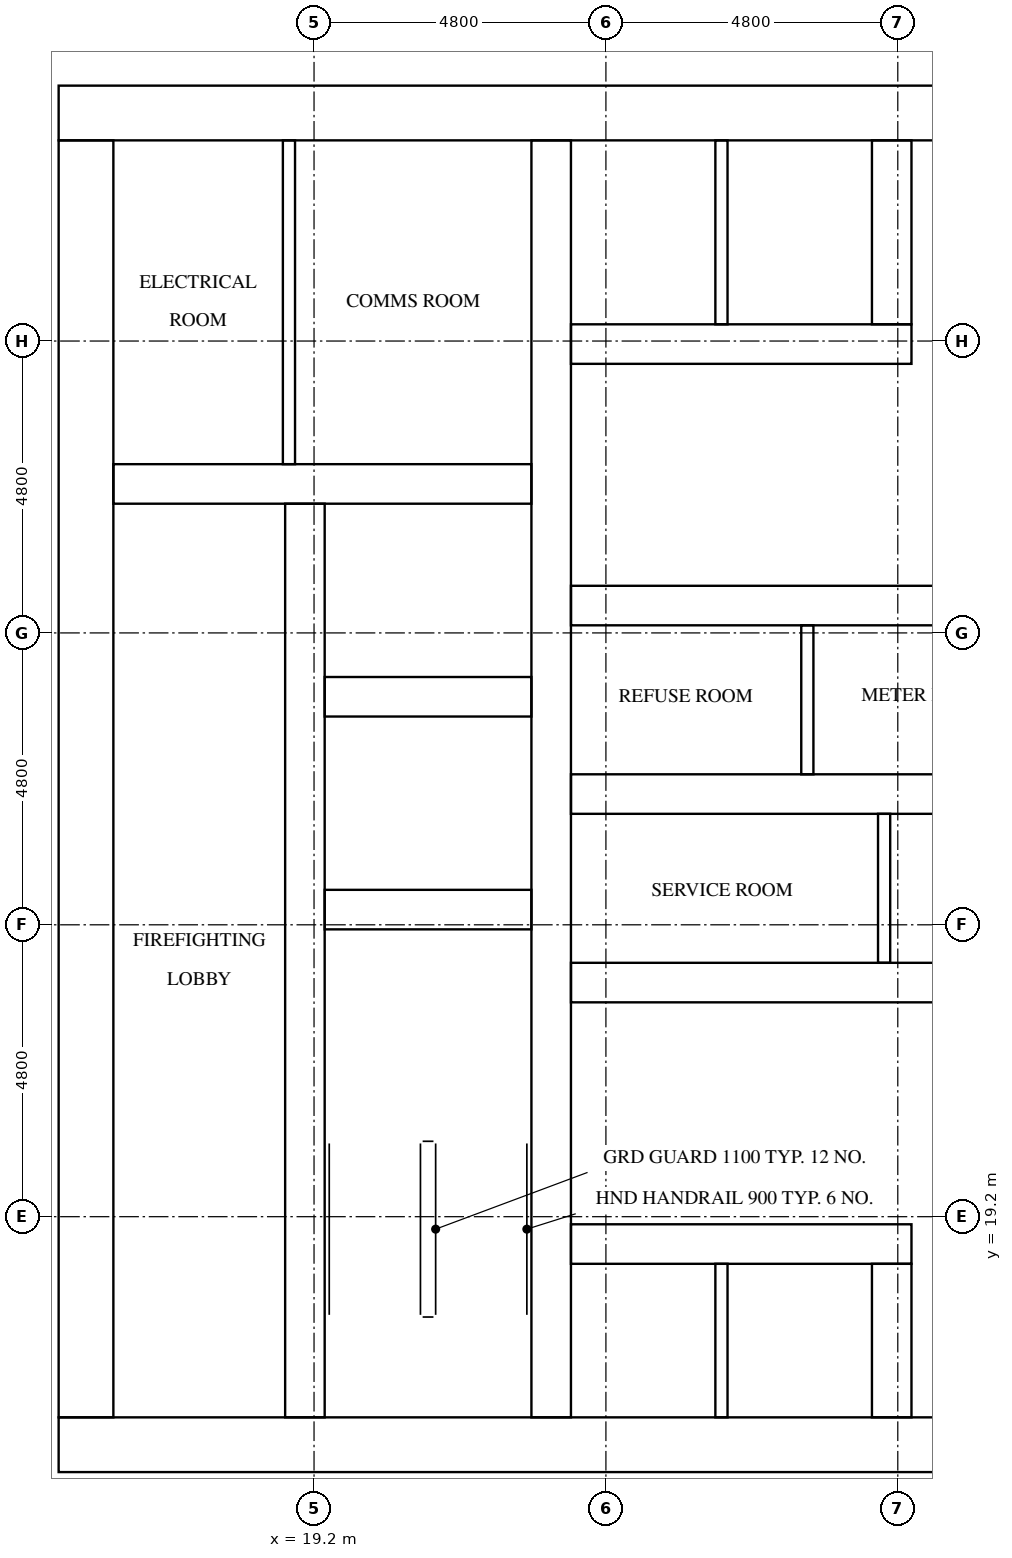
"""IFC4 building model, lengths in metres.
Left out: names, types, materials, properties, quantities, classifications, styles, units other than length and angle.
Written with IfcOpenShell. Run it as: python <this file> out.ifc"""

import sys

from ifc_helpers import new_model, si_unit, direction, frame, frame_2d, origin, place, context, subcontext, project, spatial, rectangle, extrude, element, fill, save


model = new_model("IFC4")
c1 = context("Model", 3, precision=1e-05, world=origin(), true_north=direction((0.0, 1.0)))
c2 = subcontext(c1, "Body", "Model", "MODEL_VIEW")
j1 = project(units=[si_unit("LENGTHUNIT", "METRE"), si_unit("PLANEANGLEUNIT", "RADIAN")], contexts=[c1])
p1 = place(None, origin())
s1 = spatial("IfcSite", under=j1, at=p1, CompositionType="ELEMENT")
p2 = place(p1, origin())
s2 = spatial("IfcBuilding", under=s1, at=p2, CompositionType="ELEMENT")
p3 = place(p2, frame((0.0, 0.0, 103.2)))
s3 = spatial("IfcBuildingStorey", under=s2, at=p3, CompositionType="ELEMENT", Elevation=103.2)
p4 = place(p3, frame((15.0, 15.45, 0.0), z_axis=(0.0, 0.0, 1.0), x_axis=(1.0, 0.0, 0.0)))
e1 = element("IfcWall", 1, at=p4, inside=s3, PredefinedType="SHEAR", context=c2, shape_type="SweptSolid", body=[
    extrude(rectangle(XDim=32.4, YDim=0.9, at=frame_2d((16.2, 0.0))), origin(), (0.0, 0.0, 1.0), 3.2),
])
p5 = place(p4, frame((15.3, 0.0, 0.0)))
e2 = element("IfcOpeningElement", 2, at=p5, cuts=e1, PredefinedType="OPENING", context=c2, shape_type="SweptSolid", body=[
    extrude(rectangle(XDim=1.8, YDim=2.1, at=frame_2d((0.9, 1.05))), frame((0.0, 0.46, 0.0), z_axis=(0.0, -1.0, 0.0), x_axis=(1.0, 0.0, 0.0)), (0.0, 0.0, 1.0), 0.92),
])
p6 = place(p3, frame((15.0, 37.35, 0.0), z_axis=(0.0, 0.0, 1.0), x_axis=(1.0, 0.0, 0.0)))
e3 = element("IfcWall", 3, at=p6, inside=s3, PredefinedType="SHEAR", context=c2, shape_type="SweptSolid", body=[
    extrude(rectangle(XDim=32.4, YDim=0.9, at=frame_2d((16.2, 0.0))), origin(), (0.0, 0.0, 1.0), 3.2),
])
p7 = place(p6, frame((15.3, 0.0, 0.0)))
e4 = element("IfcOpeningElement", 4, at=p7, cuts=e3, PredefinedType="OPENING", context=c2, shape_type="SweptSolid", body=[
    extrude(rectangle(XDim=1.8, YDim=2.1, at=frame_2d((0.9, 1.05))), frame((0.0, 0.46, 0.0), z_axis=(0.0, -1.0, 0.0), x_axis=(1.0, 0.0, 0.0)), (0.0, 0.0, 1.0), 0.92),
])
p8 = place(p6, frame((1.794, 0.0, 0.0)))
e5 = element("IfcOpeningElement", 5, at=p8, cuts=e3, PredefinedType="OPENING", context=c2, shape_type="SweptSolid", body=[
    extrude(rectangle(XDim=1.0, YDim=2.1, at=frame_2d((0.5, 1.05))), frame((0.0, 0.46, 0.0), z_axis=(0.0, -1.0, 0.0), x_axis=(1.0, 0.0, 0.0)), (0.0, 0.0, 1.0), 0.92),
])
p9 = place(p6, frame((5.331, 0.0, 0.0)))
e6 = element("IfcOpeningElement", 6, at=p9, cuts=e3, PredefinedType="OPENING", context=c2, shape_type="SweptSolid", body=[
    extrude(rectangle(XDim=1.0, YDim=2.1, at=frame_2d((0.5, 1.05))), frame((0.0, 0.46, 0.0), z_axis=(0.0, -1.0, 0.0), x_axis=(1.0, 0.0, 0.0)), (0.0, 0.0, 1.0), 0.92),
])
p10 = place(p3, frame((15.45, 15.9, 0.0), z_axis=(0.0, 0.0, 1.0), x_axis=(0.0, 1.0, 0.0)))
e7 = element("IfcWall", 7, at=p10, inside=s3, PredefinedType="SHEAR", context=c2, shape_type="SweptSolid", body=[
    extrude(rectangle(XDim=21.0, YDim=0.9, at=frame_2d((10.5, 0.0))), origin(), (0.0, 0.0, 1.0), 3.2),
])
p11 = place(p10, frame((4.86, 0.0, 0.0)))
e8 = element("IfcOpeningElement", 8, at=p11, cuts=e7, PredefinedType="OPENING", context=c2, shape_type="SweptSolid", body=[
    extrude(rectangle(XDim=1.2, YDim=2.1, at=frame_2d((0.6, 1.05))), frame((0.0, 0.46, 0.0), z_axis=(0.0, -1.0, 0.0), x_axis=(1.0, 0.0, 0.0)), (0.0, 0.0, 1.0), 0.92),
])
p12 = place(p3, frame((19.05, 15.9, 0.0), z_axis=(0.0, 0.0, 1.0), x_axis=(0.0, 1.0, 0.0)))
e9 = element("IfcWall", 9, at=p12, inside=s3, PredefinedType="SHEAR", context=c2, shape_type="SweptSolid", body=[
    extrude(rectangle(XDim=15.025, YDim=0.65, at=frame_2d((7.513, 0.0))), origin(), (0.0, 0.0, 1.0), 3.2),
])
p13 = place(p12, frame((9.55, 0.0, 0.0)))
e10 = element("IfcOpeningElement", 10, at=p13, cuts=e9, PredefinedType="OPENING", context=c2, shape_type="SweptSolid", body=[
    extrude(rectangle(XDim=1.1, YDim=2.1, at=frame_2d((0.55, 1.05))), frame((0.0, 0.335, 0.0), z_axis=(0.0, -1.0, 0.0), x_axis=(1.0, 0.0, 0.0)), (0.0, 0.0, 1.0), 0.67),
])
p14 = place(p12, frame((13.05, 0.0, 0.0)))
e11 = element("IfcOpeningElement", 11, at=p14, cuts=e9, PredefinedType="OPENING", context=c2, shape_type="SweptSolid", body=[
    extrude(rectangle(XDim=1.1, YDim=2.1, at=frame_2d((0.55, 1.05))), frame((0.0, 0.335, 0.0), z_axis=(0.0, -1.0, 0.0), x_axis=(1.0, 0.0, 0.0)), (0.0, 0.0, 1.0), 0.67),
])
p15 = place(p12, frame((0.3, 0.0, 0.0)))
e12 = element("IfcOpeningElement", 12, at=p15, cuts=e9, PredefinedType="OPENING", context=c2, shape_type="SweptSolid", body=[
    extrude(rectangle(XDim=1.2, YDim=2.1, at=frame_2d((0.6, 1.05))), frame((0.0, 0.335, 0.0), z_axis=(0.0, -1.0, 0.0), x_axis=(1.0, 0.0, 0.0)), (0.0, 0.0, 1.0), 0.67),
])
p16 = place(p3, frame((23.1, 15.9, 0.0), z_axis=(0.0, 0.0, 1.0), x_axis=(0.0, 1.0, 0.0)))
e13 = element("IfcWall", 13, at=p16, inside=s3, PredefinedType="SHEAR", context=c2, shape_type="SweptSolid", body=[
    extrude(rectangle(XDim=21.0, YDim=0.65, at=frame_2d((10.5, 0.0))), origin(), (0.0, 0.0, 1.0), 3.2),
])
for number, where, z_axis, x_axis in (
    (14, (19.375, 24.25, 0.0), (0.0, 0.0, 1.0), (1.0, 0.0, 0.0)),
    (15, (19.375, 27.75, 0.0), (0.0, 0.0, 1.0), (1.0, 0.0, 0.0)),
):
    element("IfcWall", number, at=place(p3, frame(where, z_axis=z_axis, x_axis=x_axis)), inside=s3, PredefinedType="SHEAR", context=c2, shape_type="SweptSolid", body=[
        extrude(rectangle(XDim=3.4, YDim=0.65, at=frame_2d((1.7, 0.0))), origin(), (0.0, 0.0, 1.0), 3.2),
    ])
p17 = place(p3, frame((15.9, 31.25, 0.0), z_axis=(0.0, 0.0, 1.0), x_axis=(1.0, 0.0, 0.0)))
e16 = element("IfcWall", 16, at=p17, inside=s3, PredefinedType="SHEAR", context=c2, shape_type="SweptSolid", body=[
    extrude(rectangle(XDim=6.875, YDim=0.65, at=frame_2d((3.438, 0.0))), origin(), (0.0, 0.0, 1.0), 3.2),
])
p18 = place(p3, frame((23.425, 18.75, 0.0), z_axis=(0.0, 0.0, 1.0), x_axis=(1.0, 0.0, 0.0)))
e17 = element("IfcWall", 17, at=p18, inside=s3, PredefinedType="SHEAR", context=c2, shape_type="SweptSolid", body=[
    extrude(rectangle(XDim=5.6, YDim=0.65, at=frame_2d((2.8, 0.0))), origin(), (0.0, 0.0, 1.0), 3.2),
])
p19 = place(p18, frame((0.637, 0.0, 0.0)))
e18 = element("IfcOpeningElement", 18, at=p19, cuts=e17, PredefinedType="OPENING", context=c2, shape_type="SweptSolid", body=[
    extrude(rectangle(XDim=1.1, YDim=2.1, at=frame_2d((0.55, 1.05))), frame((0.0, 0.335, 0.0), z_axis=(0.0, -1.0, 0.0), x_axis=(1.0, 0.0, 0.0)), (0.0, 0.0, 1.0), 0.67),
])
p20 = place(p18, frame((3.212, 0.0, 0.0)))
e19 = element("IfcOpeningElement", 19, at=p20, cuts=e17, PredefinedType="OPENING", context=c2, shape_type="SweptSolid", body=[
    extrude(rectangle(XDim=1.1, YDim=2.1, at=frame_2d((0.55, 1.05))), frame((0.0, 0.335, 0.0), z_axis=(0.0, -1.0, 0.0), x_axis=(1.0, 0.0, 0.0)), (0.0, 0.0, 1.0), 0.67),
])
p21 = place(p3, frame((23.425, 23.05, 0.0), z_axis=(0.0, 0.0, 1.0), x_axis=(1.0, 0.0, 0.0)))
e20 = element("IfcWall", 20, at=p21, inside=s3, PredefinedType="SHEAR", context=c2, shape_type="SweptSolid", body=[
    extrude(rectangle(XDim=15.55, YDim=0.65, at=frame_2d((7.775, 0.0))), origin(), (0.0, 0.0, 1.0), 3.2),
])
p22 = place(p21, frame((2.025, 0.0, 0.0)))
e21 = element("IfcOpeningElement", 21, at=p22, cuts=e20, PredefinedType="OPENING", context=c2, shape_type="SweptSolid", body=[
    extrude(rectangle(XDim=1.0, YDim=2.1, at=frame_2d((0.5, 1.05))), frame((0.0, 0.335, 0.0), z_axis=(0.0, -1.0, 0.0), x_axis=(1.0, 0.0, 0.0)), (0.0, 0.0, 1.0), 0.67),
])
p23 = place(p21, frame((11.667, 0.0, 0.0)))
e22 = element("IfcOpeningElement", 22, at=p23, cuts=e20, PredefinedType="OPENING", context=c2, shape_type="SweptSolid", body=[
    extrude(rectangle(XDim=1.0, YDim=2.1, at=frame_2d((0.5, 1.05))), frame((0.0, 0.335, 0.0), z_axis=(0.0, -1.0, 0.0), x_axis=(1.0, 0.0, 0.0)), (0.0, 0.0, 1.0), 0.67),
])
p24 = place(p21, frame((14.292, 0.0, 0.0)))
e23 = element("IfcOpeningElement", 23, at=p24, cuts=e20, PredefinedType="OPENING", context=c2, shape_type="SweptSolid", body=[
    extrude(rectangle(XDim=1.0, YDim=2.1, at=frame_2d((0.5, 1.05))), frame((0.0, 0.335, 0.0), z_axis=(0.0, -1.0, 0.0), x_axis=(1.0, 0.0, 0.0)), (0.0, 0.0, 1.0), 0.67),
])
p25 = place(p3, frame((23.425, 26.15, 0.0), z_axis=(0.0, 0.0, 1.0), x_axis=(1.0, 0.0, 0.0)))
e24 = element("IfcWall", 24, at=p25, inside=s3, PredefinedType="SHEAR", context=c2, shape_type="SweptSolid", body=[
    extrude(rectangle(XDim=15.55, YDim=0.65, at=frame_2d((7.775, 0.0))), origin(), (0.0, 0.0, 1.0), 3.2),
])
p26 = place(p3, frame((23.425, 29.25, 0.0), z_axis=(0.0, 0.0, 1.0), x_axis=(1.0, 0.0, 0.0)))
e25 = element("IfcWall", 25, at=p26, inside=s3, PredefinedType="SHEAR", context=c2, shape_type="SweptSolid", body=[
    extrude(rectangle(XDim=15.55, YDim=0.65, at=frame_2d((7.775, 0.0))), origin(), (0.0, 0.0, 1.0), 3.2),
])
p27 = place(p26, frame((1.394, 0.0, 0.0)))
e26 = element("IfcOpeningElement", 26, at=p27, cuts=e25, PredefinedType="OPENING", context=c2, shape_type="SweptSolid", body=[
    extrude(rectangle(XDim=1.0, YDim=2.1, at=frame_2d((0.5, 1.05))), frame((0.0, 0.335, 0.0), z_axis=(0.0, -1.0, 0.0), x_axis=(1.0, 0.0, 0.0)), (0.0, 0.0, 1.0), 0.67),
])
p28 = place(p26, frame((5.331, 0.0, 0.0)))
e27 = element("IfcOpeningElement", 27, at=p28, cuts=e25, PredefinedType="OPENING", context=c2, shape_type="SweptSolid", body=[
    extrude(rectangle(XDim=1.0, YDim=2.1, at=frame_2d((0.5, 1.05))), frame((0.0, 0.335, 0.0), z_axis=(0.0, -1.0, 0.0), x_axis=(1.0, 0.0, 0.0)), (0.0, 0.0, 1.0), 0.67),
])
p29 = place(p26, frame((9.219, 0.0, 0.0)))
e28 = element("IfcOpeningElement", 28, at=p29, cuts=e25, PredefinedType="OPENING", context=c2, shape_type="SweptSolid", body=[
    extrude(rectangle(XDim=1.0, YDim=2.1, at=frame_2d((0.5, 1.05))), frame((0.0, 0.335, 0.0), z_axis=(0.0, -1.0, 0.0), x_axis=(1.0, 0.0, 0.0)), (0.0, 0.0, 1.0), 0.67),
])
p30 = place(p26, frame((13.156, 0.0, 0.0)))
e29 = element("IfcOpeningElement", 29, at=p30, cuts=e25, PredefinedType="OPENING", context=c2, shape_type="SweptSolid", body=[
    extrude(rectangle(XDim=1.0, YDim=2.1, at=frame_2d((0.5, 1.05))), frame((0.0, 0.335, 0.0), z_axis=(0.0, -1.0, 0.0), x_axis=(1.0, 0.0, 0.0)), (0.0, 0.0, 1.0), 0.67),
])
p31 = place(p3, frame((23.425, 33.55, 0.0), z_axis=(0.0, 0.0, 1.0), x_axis=(1.0, 0.0, 0.0)))
e30 = element("IfcWall", 30, at=p31, inside=s3, PredefinedType="SHEAR", context=c2, shape_type="SweptSolid", body=[
    extrude(rectangle(XDim=5.6, YDim=0.65, at=frame_2d((2.8, 0.0))), origin(), (0.0, 0.0, 1.0), 3.2),
])
p32 = place(p3, frame((28.7, 15.9, 0.0), z_axis=(0.0, 0.0, 1.0), x_axis=(0.0, 1.0, 0.0)))
e31 = element("IfcWall", 31, at=p32, inside=s3, PredefinedType="SHEAR", context=c2, shape_type="SweptSolid", body=[
    extrude(rectangle(XDim=2.525, YDim=0.65, at=frame_2d((1.263, 0.0))), origin(), (0.0, 0.0, 1.0), 3.2),
])
p33 = place(p3, frame((28.7, 33.875, 0.0), z_axis=(0.0, 0.0, 1.0), x_axis=(0.0, 1.0, 0.0)))
e32 = element("IfcWall", 32, at=p33, inside=s3, PredefinedType="SHEAR", context=c2, shape_type="SweptSolid", body=[
    extrude(rectangle(XDim=3.025, YDim=0.65, at=frame_2d((1.512, 0.0))), origin(), (0.0, 0.0, 1.0), 3.2),
])
p34 = place(p3, frame((28.575, 23.375, 0.0), z_axis=(0.0, 0.0, 1.0), x_axis=(0.0, 1.0, 0.0)))
e33 = element("IfcWall", 33, at=p34, inside=s3, PredefinedType="SOLIDWALL", context=c2, shape_type="SweptSolid", body=[
    extrude(rectangle(XDim=2.45, YDim=0.2, at=frame_2d((1.225, 0.0))), origin(), (0.0, 0.0, 1.0), 3.2),
])
p35 = place(p3, frame((25.9, 15.9, 0.0), z_axis=(0.0, 0.0, 1.0), x_axis=(0.0, 1.0, 0.0)))
e34 = element("IfcWall", 34, at=p35, inside=s3, PredefinedType="SOLIDWALL", context=c2, shape_type="SweptSolid", body=[
    extrude(rectangle(XDim=2.525, YDim=0.2, at=frame_2d((1.263, 0.0))), origin(), (0.0, 0.0, 1.0), 3.2),
])
p36 = place(p3, frame((25.9, 33.875, 0.0), z_axis=(0.0, 0.0, 1.0), x_axis=(0.0, 1.0, 0.0)))
e35 = element("IfcWall", 35, at=p36, inside=s3, PredefinedType="SOLIDWALL", context=c2, shape_type="SweptSolid", body=[
    extrude(rectangle(XDim=3.025, YDim=0.2, at=frame_2d((1.512, 0.0))), origin(), (0.0, 0.0, 1.0), 3.2),
])
p37 = place(p3, frame((18.788, 31.575, 0.0), z_axis=(0.0, 0.0, 1.0), x_axis=(0.0, 1.0, 0.0)))
e36 = element("IfcWall", 36, at=p37, inside=s3, PredefinedType="PARTITIONING", context=c2, shape_type="SweptSolid", body=[
    extrude(rectangle(XDim=5.325, YDim=0.2, at=frame_2d((2.663, 0.0))), origin(), (0.0, 0.0, 1.0), 3.2),
])
p38 = place(p3, frame((27.312, 26.475, 0.0), z_axis=(0.0, 0.0, 1.0), x_axis=(0.0, 1.0, 0.0)))
e37 = element("IfcWall", 37, at=p38, inside=s3, PredefinedType="PARTITIONING", context=c2, shape_type="SweptSolid", body=[
    extrude(rectangle(XDim=2.45, YDim=0.2, at=frame_2d((1.225, 0.0))), origin(), (0.0, 0.0, 1.0), 3.2),
])
p39 = place(p19, origin())
e38 = element("IfcDoor", 38, at=p39, inside=s3, OperationType="DOUBLE_DOOR_SLIDING", PredefinedType="DOOR", context=c2, shape_type="SweptSolid", body=[
    extrude(rectangle(XDim=1.1, YDim=2.1, at=frame_2d((0.55, 1.05))), frame((0.0, 0.025, 0.0), z_axis=(0.0, -1.0, 0.0), x_axis=(1.0, 0.0, 0.0)), (0.0, 0.0, 1.0), 0.05),
])
fill(e18, e38)
p40 = place(p20, origin())
e39 = element("IfcDoor", 39, at=p40, inside=s3, OperationType="DOUBLE_DOOR_SLIDING", PredefinedType="DOOR", context=c2, shape_type="SweptSolid", body=[
    extrude(rectangle(XDim=1.1, YDim=2.1, at=frame_2d((0.55, 1.05))), frame((0.0, 0.025, 0.0), z_axis=(0.0, -1.0, 0.0), x_axis=(1.0, 0.0, 0.0)), (0.0, 0.0, 1.0), 0.05),
])
fill(e19, e39)
p41 = place(p13, origin())
e40 = element("IfcDoor", 40, at=p41, inside=s3, OperationType="DOUBLE_DOOR_SLIDING", PredefinedType="DOOR", context=c2, shape_type="SweptSolid", body=[
    extrude(rectangle(XDim=1.1, YDim=2.1, at=frame_2d((0.55, 1.05))), frame((0.0, 0.025, 0.0), z_axis=(0.0, -1.0, 0.0), x_axis=(1.0, 0.0, 0.0)), (0.0, 0.0, 1.0), 0.05),
])
fill(e10, e40)
p42 = place(p14, origin())
e41 = element("IfcDoor", 41, at=p42, inside=s3, OperationType="DOUBLE_DOOR_SLIDING", PredefinedType="DOOR", context=c2, shape_type="SweptSolid", body=[
    extrude(rectangle(XDim=1.1, YDim=2.1, at=frame_2d((0.55, 1.05))), frame((0.0, 0.025, 0.0), z_axis=(0.0, -1.0, 0.0), x_axis=(1.0, 0.0, 0.0)), (0.0, 0.0, 1.0), 0.05),
])
fill(e11, e41)
p43 = place(p15, frame((1.2, 0.0, 0.0), z_axis=(0.0, 0.0, 1.0), x_axis=(-1.0, 0.0, 0.0)))
e42 = element("IfcDoor", 42, at=p43, inside=s3, OperationType="SINGLE_SWING_RIGHT", PredefinedType="DOOR", context=c2, shape_type="SweptSolid", body=[
    extrude(rectangle(XDim=1.2, YDim=2.1, at=frame_2d((0.6, 1.05))), frame((0.0, 0.025, 0.0), z_axis=(0.0, -1.0, 0.0), x_axis=(1.0, 0.0, 0.0)), (0.0, 0.0, 1.0), 0.05),
])
fill(e12, e42)
p44 = place(p11, frame((1.2, 0.0, 0.0), z_axis=(0.0, 0.0, 1.0), x_axis=(-1.0, 0.0, 0.0)))
e43 = element("IfcDoor", 43, at=p44, inside=s3, OperationType="SINGLE_SWING_LEFT", PredefinedType="DOOR", context=c2, shape_type="SweptSolid", body=[
    extrude(rectangle(XDim=1.2, YDim=2.1, at=frame_2d((0.6, 1.05))), frame((0.0, 0.025, 0.0), z_axis=(0.0, -1.0, 0.0), x_axis=(1.0, 0.0, 0.0)), (0.0, 0.0, 1.0), 0.05),
])
fill(e8, e43)
p45 = place(p8, origin())
e44 = element("IfcDoor", 44, at=p45, inside=s3, OperationType="SINGLE_SWING_LEFT", PredefinedType="DOOR", context=c2, shape_type="SweptSolid", body=[
    extrude(rectangle(XDim=1.0, YDim=2.1, at=frame_2d((0.5, 1.05))), frame((0.0, 0.025, 0.0), z_axis=(0.0, -1.0, 0.0), x_axis=(1.0, 0.0, 0.0)), (0.0, 0.0, 1.0), 0.05),
])
fill(e5, e44)
p46 = place(p9, origin())
e45 = element("IfcDoor", 45, at=p46, inside=s3, OperationType="SINGLE_SWING_RIGHT", PredefinedType="DOOR", context=c2, shape_type="SweptSolid", body=[
    extrude(rectangle(XDim=1.0, YDim=2.1, at=frame_2d((0.5, 1.05))), frame((0.0, 0.025, 0.0), z_axis=(0.0, -1.0, 0.0), x_axis=(1.0, 0.0, 0.0)), (0.0, 0.0, 1.0), 0.05),
])
fill(e6, e45)
p47 = place(p22, frame((1.0, 0.0, 0.0), z_axis=(0.0, 0.0, 1.0), x_axis=(-1.0, 0.0, 0.0)))
e46 = element("IfcDoor", 46, at=p47, inside=s3, OperationType="SINGLE_SWING_LEFT", PredefinedType="DOOR", context=c2, shape_type="SweptSolid", body=[
    extrude(rectangle(XDim=1.0, YDim=2.1, at=frame_2d((0.5, 1.05))), frame((0.0, 0.025, 0.0), z_axis=(0.0, -1.0, 0.0), x_axis=(1.0, 0.0, 0.0)), (0.0, 0.0, 1.0), 0.05),
])
fill(e21, e46)
p48 = place(p27, origin())
e47 = element("IfcDoor", 47, at=p48, inside=s3, OperationType="SINGLE_SWING_RIGHT", PredefinedType="DOOR", context=c2, shape_type="SweptSolid", body=[
    extrude(rectangle(XDim=1.0, YDim=2.1, at=frame_2d((0.5, 1.05))), frame((0.0, 0.025, 0.0), z_axis=(0.0, -1.0, 0.0), x_axis=(1.0, 0.0, 0.0)), (0.0, 0.0, 1.0), 0.05),
])
fill(e26, e47)
p49 = place(p28, origin())
e48 = element("IfcDoor", 48, at=p49, inside=s3, OperationType="SINGLE_SWING_LEFT", PredefinedType="DOOR", context=c2, shape_type="SweptSolid", body=[
    extrude(rectangle(XDim=1.0, YDim=2.1, at=frame_2d((0.5, 1.05))), frame((0.0, 0.025, 0.0), z_axis=(0.0, -1.0, 0.0), x_axis=(1.0, 0.0, 0.0)), (0.0, 0.0, 1.0), 0.05),
])
fill(e27, e48)
save(model, sys.argv[1])
